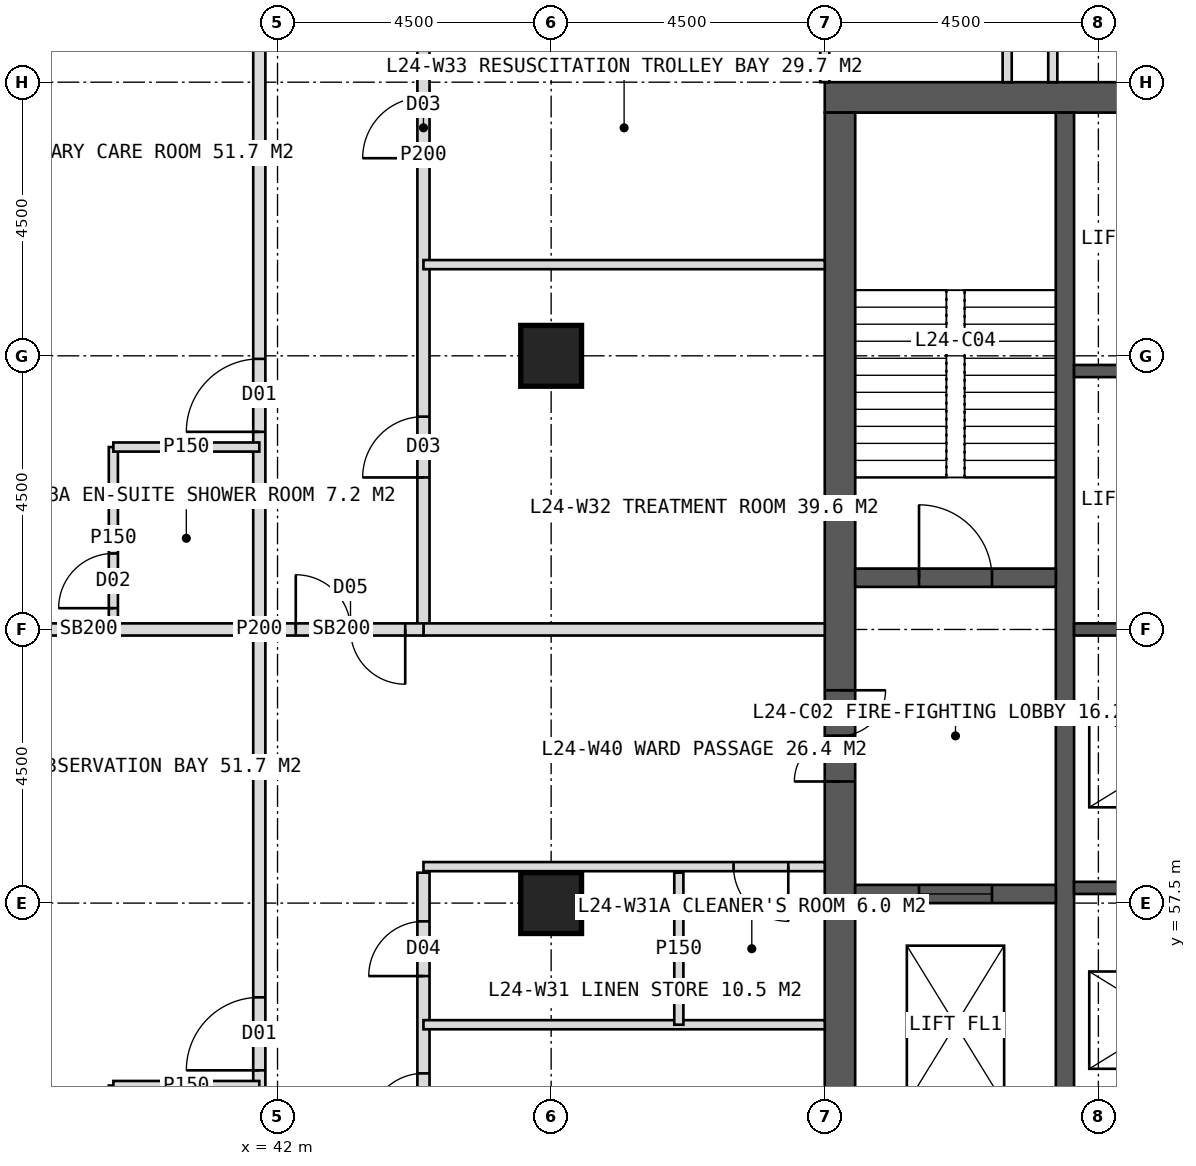
"""IFC4 building model, lengths in metres.
Left out: names, types, materials, properties, quantities, classifications, styles, units other than length and angle.
Written with IfcOpenShell. Run it as: python <this file> out.ifc"""

import sys

from ifc_helpers import new_model, si_unit, direction, frame, frame_2d, origin, origin_2d, place, context, subcontext, project, spatial, rectangle, hollow_rectangle, extrude, element, fill, save


model = new_model("IFC4")
c1 = context("Model", 3, precision=1e-05, world=origin(), true_north=direction((0.0, 1.0)))
c2 = subcontext(c1, "Body", "Model", "MODEL_VIEW")
j1 = project(units=[si_unit("LENGTHUNIT", "METRE"), si_unit("PLANEANGLEUNIT", "RADIAN")], contexts=[c1])
p1 = place(None, origin())
s1 = spatial("IfcSite", under=j1, at=p1, CompositionType="ELEMENT")
p2 = place(p1, origin())
s2 = spatial("IfcBuilding", under=s1, at=p2, CompositionType="ELEMENT")
p3 = place(p2, frame((0.0, 0.0, 104.0)))
s3 = spatial("IfcBuildingStorey", under=s2, at=p3, CompositionType="ELEMENT", Elevation=104.0)
p4 = place(p3, frame((51.0, 70.75, 0.0), z_axis=(0.0, 0.0, 1.0), x_axis=(1.0, 0.0, 0.0)))
e1 = element("IfcWall", 1, at=p4, inside=s3, PredefinedType="SHEAR", context=c2, shape_type="SweptSolid", body=[
    extrude(rectangle(XDim=18.0, YDim=0.5, at=frame_2d((9.0, 0.0))), origin(), (0.0, 0.0, 1.0), 4.0),
])
p5 = place(p4, frame((8.1, 0.0, 0.0)))
e2 = element("IfcOpeningElement", 2, at=p5, cuts=e1, PredefinedType="OPENING", context=c2, shape_type="SweptSolid", body=[
    extrude(rectangle(XDim=1.8, YDim=2.2, at=frame_2d((0.9, 1.1))), frame((0.0, 0.26, 0.0), z_axis=(0.0, -1.0, 0.0), x_axis=(1.0, 0.0, 0.0)), (0.0, 0.0, 1.0), 0.52),
])
p6 = place(p3, frame((51.25, 53.5, 0.0), z_axis=(0.0, 0.0, 1.0), x_axis=(0.0, 1.0, 0.0)))
e3 = element("IfcWall", 3, at=p6, inside=s3, PredefinedType="SHEAR", context=c2, shape_type="SweptSolid", body=[
    extrude(rectangle(XDim=17.0, YDim=0.5, at=frame_2d((8.5, 0.0))), origin(), (0.0, 0.0, 1.0), 4.0),
])
p7 = place(p6, frame((6.0, 0.0, 0.0)))
e4 = element("IfcOpeningElement", 4, at=p7, cuts=e3, PredefinedType="OPENING", context=c2, shape_type="SweptSolid", body=[
    extrude(rectangle(XDim=1.5, YDim=2.2, at=frame_2d((0.75, 1.1))), frame((0.0, 0.26, 0.0), z_axis=(0.0, -1.0, 0.0), x_axis=(1.0, 0.0, 0.0)), (0.0, 0.0, 1.0), 0.52),
])
p8 = place(p3, frame((54.95, 53.5, 0.0), z_axis=(0.0, 0.0, 1.0), x_axis=(0.0, 1.0, 0.0)))
e5 = element("IfcWall", 5, at=p8, inside=s3, PredefinedType="SHEAR", context=c2, shape_type="SweptSolid", body=[
    extrude(rectangle(XDim=17.0, YDim=0.3, at=frame_2d((8.5, 0.0))), origin(), (0.0, 0.0, 1.0), 4.0),
])
for number, where, z_axis, x_axis in (
    (6, (55.1, 57.75, 0.0), (0.0, 0.0, 1.0), (1.0, 0.0, 0.0)),
    (7, (55.1, 62.0, 0.0), (0.0, 0.0, 1.0), (1.0, 0.0, 0.0)),
    (8, (55.1, 66.25, 0.0), (0.0, 0.0, 1.0), (1.0, 0.0, 0.0)),
):
    element("IfcWall", number, at=place(p3, frame(where, z_axis=z_axis, x_axis=x_axis)), inside=s3, PredefinedType="SHEAR", context=c2, shape_type="SweptSolid", body=[
        extrude(rectangle(XDim=3.05, YDim=0.2, at=frame_2d((1.525, 0.0))), origin(), (0.0, 0.0, 1.0), 4.0),
    ])
p9 = place(p3, frame((51.5, 62.85, 0.0), z_axis=(0.0, 0.0, 1.0), x_axis=(1.0, 0.0, 0.0)))
e9 = element("IfcWall", 9, at=p9, inside=s3, PredefinedType="SHEAR", context=c2, shape_type="SweptSolid", body=[
    extrude(rectangle(XDim=3.3, YDim=0.3, at=frame_2d((1.65, 0.0))), origin(), (0.0, 0.0, 1.0), 4.0),
])
p10 = place(p9, frame((1.05, 0.0, 0.0)))
e10 = element("IfcOpeningElement", 10, at=p10, cuts=e9, PredefinedType="OPENING", context=c2, shape_type="SweptSolid", body=[
    extrude(rectangle(XDim=1.2, YDim=2.1, at=frame_2d((0.6, 1.05))), frame((0.0, 0.16, 0.0), z_axis=(0.0, -1.0, 0.0), x_axis=(1.0, 0.0, 0.0)), (0.0, 0.0, 1.0), 0.32),
])
p11 = place(p3, frame((51.5, 57.65, 0.0), z_axis=(0.0, 0.0, 1.0), x_axis=(1.0, 0.0, 0.0)))
e11 = element("IfcWall", 11, at=p11, inside=s3, PredefinedType="SHEAR", context=c2, shape_type="SweptSolid", body=[
    extrude(rectangle(XDim=3.3, YDim=0.3, at=frame_2d((1.65, 0.0))), origin(), (0.0, 0.0, 1.0), 4.0),
])
p12 = place(p11, frame((1.05, 0.0, 0.0)))
e12 = element("IfcOpeningElement", 12, at=p12, cuts=e11, PredefinedType="OPENING", context=c2, shape_type="SweptSolid", body=[
    extrude(rectangle(XDim=1.2, YDim=2.2, at=frame_2d((0.6, 1.1))), frame((0.0, 0.16, 0.0), z_axis=(0.0, -1.0, 0.0), x_axis=(1.0, 0.0, 0.0)), (0.0, 0.0, 1.0), 0.32),
])
for number, where, z_axis, x_axis in (
    (13, (46.5, 57.5, 0.0), (0.0, 0.0, 1.0), (1.0, 0.0, 0.0)),
    (14, (46.5, 66.5, 0.0), (0.0, 0.0, 1.0), (1.0, 0.0, 0.0)),
):
    element("IfcColumn", number, at=place(p3, frame(where, z_axis=z_axis, x_axis=x_axis)), inside=s3, PredefinedType="COLUMN", context=c2, shape_type="SweptSolid", body=[
        extrude(hollow_rectangle(XDim=1.0, YDim=1.0, WallThickness=0.1, at=origin_2d()), origin(), (0.0, 0.0, 1.0), 4.0),
    ])
for number, where, z_axis, x_axis in (
    (15, (51.0, 71.0, 0.0), (0.0, 0.0, 1.0), (0.0, 1.0, 0.0)),
    (16, (54.0, 71.0, 0.0), (0.0, 0.0, 1.0), (0.0, 1.0, 0.0)),
):
    element("IfcWall", number, at=place(p3, frame(where, z_axis=z_axis, x_axis=x_axis)), inside=s3, PredefinedType="PARTITIONING", context=c2, shape_type="SweptSolid", body=[
        extrude(rectangle(XDim=6.6, YDim=0.15, at=frame_2d((3.3, 0.0))), origin(), (0.0, 0.0, 1.0), 3.75),
    ])
p13 = place(p3, frame((54.75, 71.0, 0.0), z_axis=(0.0, 0.0, 1.0), x_axis=(0.0, 1.0, 0.0)))
e17 = element("IfcWall", 17, at=p13, inside=s3, PredefinedType="PARTITIONING", context=c2, shape_type="SweptSolid", body=[
    extrude(rectangle(XDim=2.4, YDim=0.15, at=frame_2d((1.2, 0.0))), origin(), (0.0, 0.0, 1.0), 3.75),
])
p14 = place(p3, frame((41.7, 62.0, 0.0), z_axis=(0.0, 0.0, 1.0), x_axis=(-1.0, 0.0, 0.0)))
e18 = element("IfcWall", 18, at=p14, inside=s3, PredefinedType="SOLIDWALL", context=c2, shape_type="SweptSolid", body=[
    extrude(rectangle(XDim=5.61, YDim=0.2, at=frame_2d((2.805, 0.0))), origin(), (0.0, 0.0, 1.0), 2.95),
])
p15 = place(p3, frame((41.7, 43.7, 0.0), z_axis=(0.0, 0.0, 1.0), x_axis=(0.0, 1.0, 0.0)))
e19 = element("IfcWall", 19, at=p15, inside=s3, PredefinedType="PARTITIONING", context=c2, shape_type="SweptSolid", body=[
    extrude(rectangle(XDim=36.6, YDim=0.2, at=frame_2d((18.3, 0.0))), origin(), (0.0, 0.0, 1.0), 3.75),
])
p16 = place(p15, frame((3.25, 0.0, 0.0)))
e20 = element("IfcOpeningElement", 20, at=p16, cuts=e19, PredefinedType="OPENING", context=c2, shape_type="SweptSolid", body=[
    extrude(rectangle(XDim=1.2, YDim=2.2, at=frame_2d((0.6, 1.1))), frame((0.0, 0.11, 0.0), z_axis=(0.0, -1.0, 0.0), x_axis=(1.0, 0.0, 0.0)), (0.0, 0.0, 1.0), 0.22),
])
p17 = place(p15, frame((11.05, 0.0, 0.0)))
e21 = element("IfcOpeningElement", 21, at=p17, cuts=e19, PredefinedType="OPENING", context=c2, shape_type="SweptSolid", body=[
    extrude(rectangle(XDim=1.2, YDim=2.2, at=frame_2d((0.6, 1.1))), frame((0.0, 0.11, 0.0), z_axis=(0.0, -1.0, 0.0), x_axis=(1.0, 0.0, 0.0)), (0.0, 0.0, 1.0), 0.22),
])
p18 = place(p15, frame((21.55, 0.0, 0.0)))
e22 = element("IfcOpeningElement", 22, at=p18, cuts=e19, PredefinedType="OPENING", context=c2, shape_type="SweptSolid", body=[
    extrude(rectangle(XDim=1.2, YDim=2.2, at=frame_2d((0.6, 1.1))), frame((0.0, 0.11, 0.0), z_axis=(0.0, -1.0, 0.0), x_axis=(1.0, 0.0, 0.0)), (0.0, 0.0, 1.0), 0.22),
])
p19 = place(p15, frame((32.05, 0.0, 0.0)))
e23 = element("IfcOpeningElement", 23, at=p19, cuts=e19, PredefinedType="OPENING", context=c2, shape_type="SweptSolid", body=[
    extrude(rectangle(XDim=1.2, YDim=2.2, at=frame_2d((0.6, 1.1))), frame((0.0, 0.11, 0.0), z_axis=(0.0, -1.0, 0.0), x_axis=(1.0, 0.0, 0.0)), (0.0, 0.0, 1.0), 0.22),
])
p20 = place(p3, frame((41.7, 54.5, 0.0), z_axis=(0.0, 0.0, 1.0), x_axis=(-1.0, 0.0, 0.0)))
e24 = element("IfcWall", 24, at=p20, inside=s3, PredefinedType="PARTITIONING", context=c2, shape_type="SweptSolid", body=[
    extrude(rectangle(XDim=2.4, YDim=0.15, at=frame_2d((1.2, 0.0))), origin(), (0.0, 0.0, 1.0), 3.75),
])
p21 = place(p3, frame((39.3, 62.0, 0.0), z_axis=(0.0, 0.0, 1.0), x_axis=(0.0, 1.0, 0.0)))
e25 = element("IfcWall", 25, at=p21, inside=s3, PredefinedType="PARTITIONING", context=c2, shape_type="SweptSolid", body=[
    extrude(rectangle(XDim=3.0, YDim=0.15, at=frame_2d((1.5, 0.0))), origin(), (0.0, 0.0, 1.0), 3.75),
])
p22 = place(p21, frame((0.35, 0.0, 0.0)))
e26 = element("IfcOpeningElement", 26, at=p22, cuts=e25, PredefinedType="OPENING", context=c2, shape_type="SweptSolid", body=[
    extrude(rectangle(XDim=0.9, YDim=2.1, at=frame_2d((0.45, 1.05))), frame((0.0, 0.085, 0.0), z_axis=(0.0, -1.0, 0.0), x_axis=(1.0, 0.0, 0.0)), (0.0, 0.0, 1.0), 0.17),
])
p23 = place(p3, frame((41.7, 65.0, 0.0), z_axis=(0.0, 0.0, 1.0), x_axis=(-1.0, 0.0, 0.0)))
e27 = element("IfcWall", 27, at=p23, inside=s3, PredefinedType="PARTITIONING", context=c2, shape_type="SweptSolid", body=[
    extrude(rectangle(XDim=2.4, YDim=0.15, at=frame_2d((1.2, 0.0))), origin(), (0.0, 0.0, 1.0), 3.75),
])
p24 = place(p3, frame((44.4, 46.4, 0.0), z_axis=(0.0, 0.0, 1.0), x_axis=(0.0, 1.0, 0.0)))
e28 = element("IfcWall", 28, at=p24, inside=s3, PredefinedType="PARTITIONING", context=c2, shape_type="SweptSolid", body=[
    extrude(rectangle(XDim=11.6, YDim=0.2, at=frame_2d((5.8, 0.0))), origin(), (0.0, 0.0, 1.0), 3.75),
])
p25 = place(p24, frame((7.4, 0.0, 0.0)))
e29 = element("IfcOpeningElement", 29, at=p25, cuts=e28, PredefinedType="OPENING", context=c2, shape_type="SweptSolid", body=[
    extrude(rectangle(XDim=0.9, YDim=2.1, at=frame_2d((0.45, 1.05))), frame((0.0, 0.11, 0.0), z_axis=(0.0, -1.0, 0.0), x_axis=(1.0, 0.0, 0.0)), (0.0, 0.0, 1.0), 0.22),
])
p26 = place(p24, frame((9.9, 0.0, 0.0)))
e30 = element("IfcOpeningElement", 30, at=p26, cuts=e28, PredefinedType="OPENING", context=c2, shape_type="SweptSolid", body=[
    extrude(rectangle(XDim=0.9, YDim=2.1, at=frame_2d((0.45, 1.05))), frame((0.0, 0.11, 0.0), z_axis=(0.0, -1.0, 0.0), x_axis=(1.0, 0.0, 0.0)), (0.0, 0.0, 1.0), 0.22),
])
p27 = place(p3, frame((44.4, 62.0, 0.0), z_axis=(0.0, 0.0, 1.0), x_axis=(0.0, 1.0, 0.0)))
e31 = element("IfcWall", 31, at=p27, inside=s3, PredefinedType="PARTITIONING", context=c2, shape_type="SweptSolid", body=[
    extrude(rectangle(XDim=15.6, YDim=0.2, at=frame_2d((7.8, 0.0))), origin(), (0.0, 0.0, 1.0), 3.75),
])
p28 = place(p27, frame((2.5, 0.0, 0.0)))
e32 = element("IfcOpeningElement", 32, at=p28, cuts=e31, PredefinedType="OPENING", context=c2, shape_type="SweptSolid", body=[
    extrude(rectangle(XDim=1.0, YDim=2.1, at=frame_2d((0.5, 1.05))), frame((0.0, 0.11, 0.0), z_axis=(0.0, -1.0, 0.0), x_axis=(1.0, 0.0, 0.0)), (0.0, 0.0, 1.0), 0.22),
])
p29 = place(p27, frame((7.75, 0.0, 0.0)))
e33 = element("IfcOpeningElement", 33, at=p29, cuts=e31, PredefinedType="OPENING", context=c2, shape_type="SweptSolid", body=[
    extrude(rectangle(XDim=1.0, YDim=2.1, at=frame_2d((0.5, 1.05))), frame((0.0, 0.11, 0.0), z_axis=(0.0, -1.0, 0.0), x_axis=(1.0, 0.0, 0.0)), (0.0, 0.0, 1.0), 0.22),
])
p30 = place(p27, frame((12.55, 0.0, 0.0)))
e34 = element("IfcOpeningElement", 34, at=p30, cuts=e31, PredefinedType="OPENING", context=c2, shape_type="SweptSolid", body=[
    extrude(rectangle(XDim=1.0, YDim=2.1, at=frame_2d((0.5, 1.05))), frame((0.0, 0.11, 0.0), z_axis=(0.0, -1.0, 0.0), x_axis=(1.0, 0.0, 0.0)), (0.0, 0.0, 1.0), 0.22),
])
p31 = place(p3, frame((51.0, 58.1, 0.0), z_axis=(0.0, 0.0, 1.0), x_axis=(-1.0, 0.0, 0.0)))
e35 = element("IfcWall", 35, at=p31, inside=s3, PredefinedType="PARTITIONING", context=c2, shape_type="SweptSolid", body=[
    extrude(rectangle(XDim=6.6, YDim=0.15, at=frame_2d((3.3, 0.0))), origin(), (0.0, 0.0, 1.0), 3.75),
])
p32 = place(p31, frame((0.6, 0.0, 0.0)))
e36 = element("IfcOpeningElement", 36, at=p32, cuts=e35, PredefinedType="OPENING", context=c2, shape_type="SweptSolid", body=[
    extrude(rectangle(XDim=0.9, YDim=2.1, at=frame_2d((0.45, 1.05))), frame((0.0, 0.085, 0.0), z_axis=(0.0, -1.0, 0.0), x_axis=(1.0, 0.0, 0.0)), (0.0, 0.0, 1.0), 0.17),
])
p33 = place(p3, frame((51.0, 62.0, 0.0), z_axis=(0.0, 0.0, 1.0), x_axis=(-1.0, 0.0, 0.0)))
e37 = element("IfcWall", 37, at=p33, inside=s3, PredefinedType="SOLIDWALL", context=c2, shape_type="SweptSolid", body=[
    extrude(rectangle(XDim=6.6, YDim=0.2, at=frame_2d((3.3, 0.0))), origin(), (0.0, 0.0, 1.0), 2.95),
])
for number, where, z_axis, x_axis in (
    (38, (51.0, 55.5, 0.0), (0.0, 0.0, 1.0), (-1.0, 0.0, 0.0)),
    (39, (51.0, 68.0, 0.0), (0.0, 0.0, 1.0), (-1.0, 0.0, 0.0)),
):
    element("IfcWall", number, at=place(p3, frame(where, z_axis=z_axis, x_axis=x_axis)), inside=s3, PredefinedType="PARTITIONING", context=c2, shape_type="SweptSolid", body=[
        extrude(rectangle(XDim=6.6, YDim=0.15, at=frame_2d((3.3, 0.0))), origin(), (0.0, 0.0, 1.0), 3.75),
    ])
p34 = place(p3, frame((48.6, 55.5, 0.0), z_axis=(0.0, 0.0, 1.0), x_axis=(0.0, 1.0, 0.0)))
e40 = element("IfcWall", 40, at=p34, inside=s3, PredefinedType="PARTITIONING", context=c2, shape_type="SweptSolid", body=[
    extrude(rectangle(XDim=2.5, YDim=0.15, at=frame_2d((1.25, 0.0))), origin(), (0.0, 0.0, 1.0), 3.75),
])
p35 = place(p3, frame((44.4, 62.0, 0.0), z_axis=(0.0, 0.0, 1.0), x_axis=(-1.0, 0.0, 0.0)))
e41 = element("IfcWall", 41, at=p35, inside=s3, PredefinedType="SOLIDWALL", context=c2, shape_type="SweptSolid", body=[
    extrude(rectangle(XDim=2.7, YDim=0.2, at=frame_2d((1.35, 0.0))), origin(), (0.0, 0.0, 1.0), 2.95),
])
p36 = place(p35, frame((0.3, 0.0, 0.0)))
e42 = element("IfcOpeningElement", 42, at=p36, cuts=e41, PredefinedType="OPENING", context=c2, shape_type="SweptSolid", body=[
    extrude(rectangle(XDim=1.8, YDim=2.2, at=frame_2d((0.9, 1.1))), frame((0.0, 0.11, 0.0), z_axis=(0.0, -1.0, 0.0), x_axis=(1.0, 0.0, 0.0)), (0.0, 0.0, 1.0), 0.22),
])
p37 = place(p17, origin())
e43 = element("IfcDoor", 43, at=p37, inside=s3, OperationType="SINGLE_SWING_LEFT", PredefinedType="DOOR", context=c2, shape_type="SweptSolid", body=[
    extrude(rectangle(XDim=1.2, YDim=2.2, at=frame_2d((0.6, 1.1))), frame((0.0, 0.025, 0.0), z_axis=(0.0, -1.0, 0.0), x_axis=(1.0, 0.0, 0.0)), (0.0, 0.0, 1.0), 0.05),
])
fill(e21, e43)
p38 = place(p18, origin())
e44 = element("IfcDoor", 44, at=p38, inside=s3, OperationType="SINGLE_SWING_LEFT", PredefinedType="DOOR", context=c2, shape_type="SweptSolid", body=[
    extrude(rectangle(XDim=1.2, YDim=2.2, at=frame_2d((0.6, 1.1))), frame((0.0, 0.025, 0.0), z_axis=(0.0, -1.0, 0.0), x_axis=(1.0, 0.0, 0.0)), (0.0, 0.0, 1.0), 0.05),
])
fill(e22, e44)
p39 = place(p22, origin())
e45 = element("IfcDoor", 45, at=p39, inside=s3, OperationType="SINGLE_SWING_LEFT", PredefinedType="DOOR", context=c2, shape_type="SweptSolid", body=[
    extrude(rectangle(XDim=0.9, YDim=2.1, at=frame_2d((0.45, 1.05))), frame((0.0, 0.025, 0.0), z_axis=(0.0, -1.0, 0.0), x_axis=(1.0, 0.0, 0.0)), (0.0, 0.0, 1.0), 0.05),
])
fill(e26, e45)
p40 = place(p25, origin())
e46 = element("IfcDoor", 46, at=p40, inside=s3, OperationType="SINGLE_SWING_LEFT", PredefinedType="DOOR", context=c2, shape_type="SweptSolid", body=[
    extrude(rectangle(XDim=0.9, YDim=2.1, at=frame_2d((0.45, 1.05))), frame((0.0, 0.025, 0.0), z_axis=(0.0, -1.0, 0.0), x_axis=(1.0, 0.0, 0.0)), (0.0, 0.0, 1.0), 0.05),
])
fill(e29, e46)
p41 = place(p32, origin())
e47 = element("IfcDoor", 47, at=p41, inside=s3, OperationType="SINGLE_SWING_LEFT", PredefinedType="DOOR", context=c2, shape_type="SweptSolid", body=[
    extrude(rectangle(XDim=0.9, YDim=2.1, at=frame_2d((0.45, 1.05))), frame((0.0, 0.025, 0.0), z_axis=(0.0, -1.0, 0.0), x_axis=(1.0, 0.0, 0.0)), (0.0, 0.0, 1.0), 0.05),
])
fill(e36, e47)
p42 = place(p26, origin())
e48 = element("IfcDoor", 48, at=p42, inside=s3, OperationType="SINGLE_SWING_LEFT", PredefinedType="DOOR", context=c2, shape_type="SweptSolid", body=[
    extrude(rectangle(XDim=0.9, YDim=2.1, at=frame_2d((0.45, 1.05))), frame((0.0, 0.025, 0.0), z_axis=(0.0, -1.0, 0.0), x_axis=(1.0, 0.0, 0.0)), (0.0, 0.0, 1.0), 0.05),
])
fill(e30, e48)
p43 = place(p28, origin())
e49 = element("IfcDoor", 49, at=p43, inside=s3, OperationType="SINGLE_SWING_LEFT", PredefinedType="DOOR", context=c2, shape_type="SweptSolid", body=[
    extrude(rectangle(XDim=1.0, YDim=2.1, at=frame_2d((0.5, 1.05))), frame((0.0, 0.025, 0.0), z_axis=(0.0, -1.0, 0.0), x_axis=(1.0, 0.0, 0.0)), (0.0, 0.0, 1.0), 0.05),
])
fill(e32, e49)
p44 = place(p29, origin())
e50 = element("IfcDoor", 50, at=p44, inside=s3, OperationType="SINGLE_SWING_LEFT", PredefinedType="DOOR", context=c2, shape_type="SweptSolid", body=[
    extrude(rectangle(XDim=1.0, YDim=2.1, at=frame_2d((0.5, 1.05))), frame((0.0, 0.025, 0.0), z_axis=(0.0, -1.0, 0.0), x_axis=(1.0, 0.0, 0.0)), (0.0, 0.0, 1.0), 0.05),
])
fill(e33, e50)
p45 = place(p36, origin())
e51 = element("IfcDoor", 51, at=p45, inside=s3, OperationType="DOUBLE_DOOR_DOUBLE_SWING", PredefinedType="DOOR", context=c2, shape_type="SweptSolid", body=[
    extrude(rectangle(XDim=1.8, YDim=2.2, at=frame_2d((0.9, 1.1))), frame((0.0, 0.025, 0.0), z_axis=(0.0, -1.0, 0.0), x_axis=(1.0, 0.0, 0.0)), (0.0, 0.0, 1.0), 0.05),
])
fill(e42, e51)
p46 = place(p7, origin())
e52 = element("IfcDoor", 52, at=p46, inside=s3, OperationType="DOUBLE_DOOR_SINGLE_SWING", PredefinedType="DOOR", context=c2, shape_type="SweptSolid", body=[
    extrude(rectangle(XDim=1.5, YDim=2.2, at=frame_2d((0.75, 1.1))), frame((0.0, 0.025, 0.0), z_axis=(0.0, -1.0, 0.0), x_axis=(1.0, 0.0, 0.0)), (0.0, 0.0, 1.0), 0.05),
])
fill(e4, e52)
p47 = place(p10, origin())
e53 = element("IfcDoor", 53, at=p47, inside=s3, OperationType="SINGLE_SWING_LEFT", PredefinedType="DOOR", context=c2, shape_type="SweptSolid", body=[
    extrude(rectangle(XDim=1.2, YDim=2.1, at=frame_2d((0.6, 1.05))), frame((0.0, 0.025, 0.0), z_axis=(0.0, -1.0, 0.0), x_axis=(1.0, 0.0, 0.0)), (0.0, 0.0, 1.0), 0.05),
])
fill(e10, e53)
p48 = place(p12, origin())
e54 = element("IfcDoor", 54, at=p48, inside=s3, OperationType="SLIDING_TO_LEFT", PredefinedType="DOOR", context=c2, shape_type="SweptSolid", body=[
    extrude(rectangle(XDim=1.2, YDim=2.2, at=frame_2d((0.6, 1.1))), frame((0.0, 0.025, 0.0), z_axis=(0.0, -1.0, 0.0), x_axis=(1.0, 0.0, 0.0)), (0.0, 0.0, 1.0), 0.05),
])
fill(e12, e54)
save(model, sys.argv[1])
